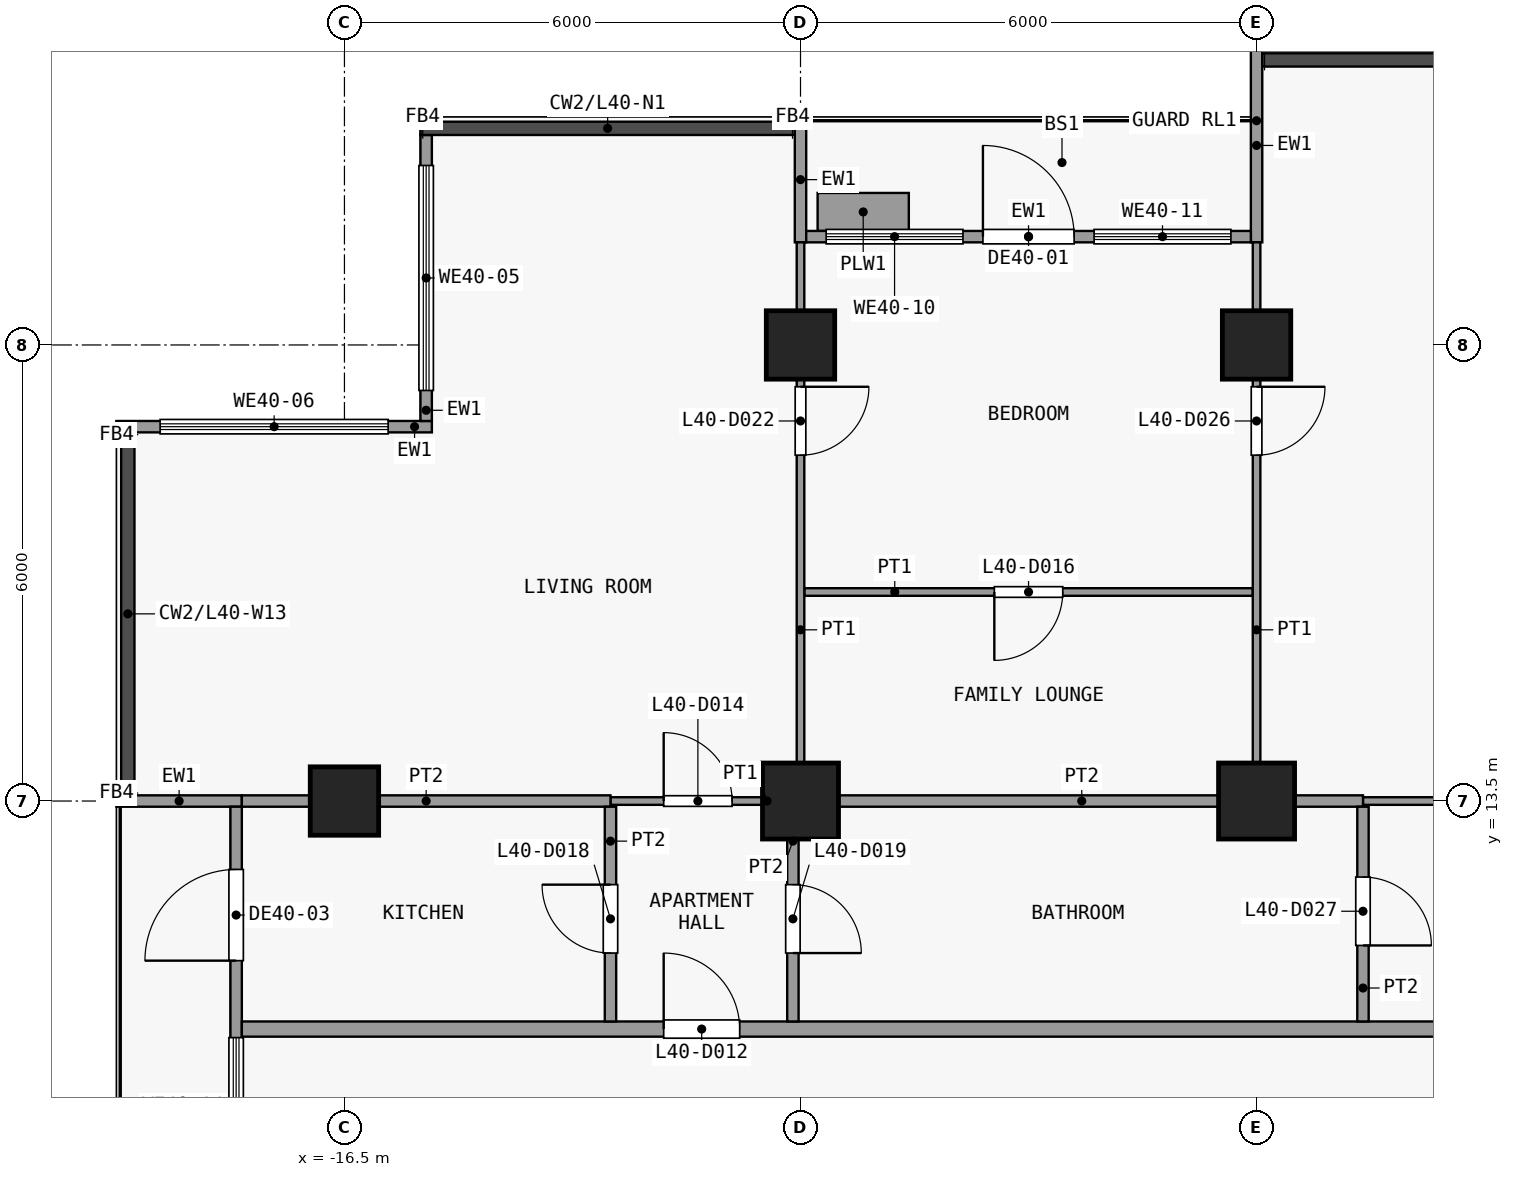
"""IFC4 building model, lengths in metres.
Left out: names, types, materials, properties, quantities, classifications, styles, units other than length and angle.
Written with IfcOpenShell. Run it as: python <this file> out.ifc"""

import sys

from ifc_helpers import new_model, si_unit, direction, frame, frame_2d, origin, origin_2d, place, context, subcontext, project, spatial, rectangle, extrude, element, fill, save


model = new_model("IFC4")
c1 = context("Model", 3, precision=1e-05, world=origin(), true_north=direction((0.0, 1.0)))
c2 = subcontext(c1, "Body", "Model", "MODEL_VIEW")
j1 = project(units=[si_unit("LENGTHUNIT", "METRE"), si_unit("PLANEANGLEUNIT", "RADIAN")], contexts=[c1])
p1 = place(None, origin())
s1 = spatial("IfcSite", under=j1, at=p1, CompositionType="ELEMENT")
p2 = place(p1, origin())
s2 = spatial("IfcBuilding", under=s1, at=p2, CompositionType="ELEMENT")
p3 = place(p2, frame((0.0, 0.0, 163.7)))
s3 = spatial("IfcBuildingStorey", under=s2, at=p3, CompositionType="ELEMENT", Elevation=163.7)
p4 = place(p3, frame((-16.5, 13.5, 0.0), z_axis=(0.0, 0.0, 1.0), x_axis=(1.0, 0.0, 0.0)))
e1 = element("IfcColumn", 1, at=p4, inside=s3, PredefinedType="COLUMN", context=c2, shape_type="SweptSolid", body=[
    extrude(rectangle(XDim=0.9, YDim=0.9, at=origin_2d()), origin(), (0.0, 0.0, 1.0), 3.6),
])
p5 = place(p3, frame((-10.5, 13.5, 0.0), z_axis=(0.0, 0.0, 1.0), x_axis=(1.0, 0.0, 0.0)))
e2 = element("IfcColumn", 2, at=p5, inside=s3, PredefinedType="COLUMN", context=c2, shape_type="SweptSolid", body=[
    extrude(rectangle(XDim=1.0, YDim=1.0, at=origin_2d()), origin(), (0.0, 0.0, 1.0), 3.6),
])
p6 = place(p3, frame((-10.5, 19.5, 0.0), z_axis=(0.0, 0.0, 1.0), x_axis=(1.0, 0.0, 0.0)))
e3 = element("IfcColumn", 3, at=p6, inside=s3, PredefinedType="COLUMN", context=c2, shape_type="SweptSolid", body=[
    extrude(rectangle(XDim=0.9, YDim=0.9, at=origin_2d()), origin(), (0.0, 0.0, 1.0), 3.6),
])
p7 = place(p3, frame((-4.5, 13.5, 0.0), z_axis=(0.0, 0.0, 1.0), x_axis=(1.0, 0.0, 0.0)))
e4 = element("IfcColumn", 4, at=p7, inside=s3, PredefinedType="COLUMN", context=c2, shape_type="SweptSolid", body=[
    extrude(rectangle(XDim=1.0, YDim=1.0, at=origin_2d()), origin(), (0.0, 0.0, 1.0), 3.6),
])
p8 = place(p3, frame((-4.5, 19.5, 0.0), z_axis=(0.0, 0.0, 1.0), x_axis=(1.0, 0.0, 0.0)))
e5 = element("IfcColumn", 5, at=p8, inside=s3, PredefinedType="COLUMN", context=c2, shape_type="SweptSolid", body=[
    extrude(rectangle(XDim=0.9, YDim=0.9, at=origin_2d()), origin(), (0.0, 0.0, 1.0), 3.6),
])
p9 = place(p3, frame((-15.425, 18.5, 0.0), z_axis=(0.0, 0.0, 1.0), x_axis=(0.0, 1.0, 0.0)))
e6 = element("IfcWall", 6, at=p9, inside=s3, PredefinedType="SOLIDWALL", context=c2, shape_type="SweptSolid", body=[
    extrude(rectangle(XDim=3.762, YDim=0.15, at=frame_2d((1.881, 0.0))), origin(), (0.0, 0.0, 1.0), 3.3),
])
p10 = place(p9, frame((0.401, 0.0, 0.9)))
e7 = element("IfcOpeningElement", 7, at=p10, cuts=e6, PredefinedType="OPENING", context=c2, shape_type="SweptSolid", body=[
    extrude(rectangle(XDim=2.96, YDim=2.4, at=frame_2d((1.48, 1.2))), frame((0.0, 0.085, 0.0), z_axis=(0.0, -1.0, 0.0), x_axis=(1.0, 0.0, 0.0)), (0.0, 0.0, 1.0), 0.17),
])
p11 = place(p3, frame((-19.5, 18.425, 0.0), z_axis=(0.0, 0.0, 1.0), x_axis=(1.0, 0.0, 0.0)))
e8 = element("IfcWall", 8, at=p11, inside=s3, PredefinedType="SOLIDWALL", context=c2, shape_type="SweptSolid", body=[
    extrude(rectangle(XDim=4.15, YDim=0.15, at=frame_2d((2.075, 0.0))), origin(), (0.0, 0.0, 1.0), 3.3),
])
p12 = place(p11, frame((0.575, 0.0, 0.9)))
e9 = element("IfcOpeningElement", 9, at=p12, cuts=e8, PredefinedType="OPENING", context=c2, shape_type="SweptSolid", body=[
    extrude(rectangle(XDim=3.0, YDim=2.4, at=frame_2d((1.5, 1.2))), frame((0.0, 0.085, 0.0), z_axis=(0.0, -1.0, 0.0), x_axis=(1.0, 0.0, 0.0)), (0.0, 0.0, 1.0), 0.17),
])
p13 = place(p3, frame((-10.5, 20.85, 0.0), z_axis=(0.0, 0.0, 1.0), x_axis=(0.0, 1.0, 0.0)))
e10 = element("IfcWall", 10, at=p13, inside=s3, PredefinedType="SOLIDWALL", context=c2, shape_type="SweptSolid", body=[
    extrude(rectangle(XDim=1.65, YDim=0.15, at=frame_2d((0.825, 0.0))), origin(), (0.0, 0.0, 1.0), 3.3),
])
p14 = place(p3, frame((-4.5, 20.85, 0.0), z_axis=(0.0, 0.0, 1.0), x_axis=(0.0, 1.0, 0.0)))
e11 = element("IfcWall", 11, at=p14, inside=s3, PredefinedType="SOLIDWALL", context=c2, shape_type="SweptSolid", body=[
    extrude(rectangle(XDim=2.55, YDim=0.15, at=frame_2d((1.275, 0.0))), origin(), (0.0, 0.0, 1.0), 3.3),
])
p15 = place(p3, frame((-10.425, 20.925, 0.0), z_axis=(0.0, 0.0, 1.0), x_axis=(1.0, 0.0, 0.0)))
e12 = element("IfcWall", 12, at=p15, inside=s3, PredefinedType="SOLIDWALL", context=c2, shape_type="SweptSolid", body=[
    extrude(rectangle(XDim=5.85, YDim=0.15, at=frame_2d((2.925, 0.0))), origin(), (0.0, 0.0, 1.0), 3.3),
])
p16 = place(p15, frame((2.325, 0.0, 0.0)))
e13 = element("IfcOpeningElement", 13, at=p16, cuts=e12, PredefinedType="OPENING", context=c2, shape_type="SweptSolid", body=[
    extrude(rectangle(XDim=1.2, YDim=2.4, at=frame_2d((0.6, 1.2))), frame((0.0, 0.085, 0.0), z_axis=(0.0, -1.0, 0.0), x_axis=(1.0, 0.0, 0.0)), (0.0, 0.0, 1.0), 0.17),
])
p17 = place(p15, frame((0.262, 0.0, 0.9)))
e14 = element("IfcOpeningElement", 14, at=p17, cuts=e12, PredefinedType="OPENING", context=c2, shape_type="SweptSolid", body=[
    extrude(rectangle(XDim=1.8, YDim=2.1, at=frame_2d((0.9, 1.05))), frame((0.0, 0.085, 0.0), z_axis=(0.0, -1.0, 0.0), x_axis=(1.0, 0.0, 0.0)), (0.0, 0.0, 1.0), 0.17),
])
p18 = place(p15, frame((3.788, 0.0, 0.9)))
e15 = element("IfcOpeningElement", 15, at=p18, cuts=e12, PredefinedType="OPENING", context=c2, shape_type="SweptSolid", body=[
    extrude(rectangle(XDim=1.8, YDim=2.1, at=frame_2d((0.9, 1.05))), frame((0.0, 0.085, 0.0), z_axis=(0.0, -1.0, 0.0), x_axis=(1.0, 0.0, 0.0)), (0.0, 0.0, 1.0), 0.17),
])
p19 = place(p3, frame((-10.275, 21.25, 0.0), z_axis=(0.0, 0.0, 1.0), x_axis=(1.0, 0.0, 0.0)))
e16 = element("IfcWall", 16, at=p19, inside=s3, PredefinedType="USERDEFINED", context=c2, shape_type="SweptSolid", body=[
    extrude(rectangle(XDim=1.2, YDim=0.5, at=frame_2d((0.6, 0.0))), origin(), (0.0, 0.0, 1.0), 0.9),
])
p20 = place(p3, frame((-17.85, 13.5, 0.0), z_axis=(0.0, 0.0, 1.0), x_axis=(-1.0, 0.0, 0.0)))
e17 = element("IfcWall", 17, at=p20, inside=s3, PredefinedType="SOLIDWALL", context=c2, shape_type="SweptSolid", body=[
    extrude(rectangle(XDim=1.65, YDim=0.15, at=frame_2d((0.825, 0.0))), origin(), (0.0, 0.0, 1.0), 3.3),
])
p21 = place(p3, frame((-17.925, 7.575, 0.0), z_axis=(0.0, 0.0, 1.0), x_axis=(0.0, 1.0, 0.0)))
e18 = element("IfcWall", 18, at=p21, inside=s3, PredefinedType="SOLIDWALL", context=c2, shape_type="SweptSolid", body=[
    extrude(rectangle(XDim=5.85, YDim=0.15, at=frame_2d((2.925, 0.0))), origin(), (0.0, 0.0, 1.0), 3.3),
])
p22 = place(p21, frame((3.825, 0.0, 0.0)))
e19 = element("IfcOpeningElement", 19, at=p22, cuts=e18, PredefinedType="OPENING", context=c2, shape_type="SweptSolid", body=[
    extrude(rectangle(XDim=1.2, YDim=2.4, at=frame_2d((0.6, 1.2))), frame((0.0, 0.085, 0.0), z_axis=(0.0, -1.0, 0.0), x_axis=(1.0, 0.0, 0.0)), (0.0, 0.0, 1.0), 0.17),
])
p23 = place(p21, frame((1.012, 0.0, 0.9)))
e20 = element("IfcOpeningElement", 20, at=p23, cuts=e18, PredefinedType="OPENING", context=c2, shape_type="SweptSolid", body=[
    extrude(rectangle(XDim=1.8, YDim=2.1, at=frame_2d((0.9, 1.05))), frame((0.0, 0.085, 0.0), z_axis=(0.0, -1.0, 0.0), x_axis=(1.0, 0.0, 0.0)), (0.0, 0.0, 1.0), 0.17),
])
p24 = place(p3, frame((-17.85, 10.5, 0.0), z_axis=(0.0, 0.0, 1.0), x_axis=(1.0, 0.0, 0.0)))
e21 = element("IfcWall", 21, at=p24, inside=s3, PredefinedType="PARTITIONING", context=c2, shape_type="SweptSolid", body=[
    extrude(rectangle(XDim=37.2, YDim=0.2, at=frame_2d((18.6, 0.0))), origin(), (0.0, 0.0, 1.0), 3.3),
])
p25 = place(p24, frame((5.55, 0.0, 0.0)))
e22 = element("IfcOpeningElement", 22, at=p25, cuts=e21, PredefinedType="OPENING", context=c2, shape_type="SweptSolid", body=[
    extrude(rectangle(XDim=1.0, YDim=2.1, at=frame_2d((0.5, 1.05))), frame((0.0, 0.11, 0.0), z_axis=(0.0, -1.0, 0.0), x_axis=(1.0, 0.0, 0.0)), (0.0, 0.0, 1.0), 0.22),
])
p26 = place(p24, frame((25.55, 0.0, 0.0)))
e23 = element("IfcOpeningElement", 23, at=p26, cuts=e21, PredefinedType="OPENING", context=c2, shape_type="SweptSolid", body=[
    extrude(rectangle(XDim=1.0, YDim=2.1, at=frame_2d((0.5, 1.05))), frame((0.0, 0.11, 0.0), z_axis=(0.0, -1.0, 0.0), x_axis=(1.0, 0.0, 0.0)), (0.0, 0.0, 1.0), 0.22),
])
p27 = place(p3, frame((-13.0, 13.5, 0.0), z_axis=(0.0, 0.0, 1.0), x_axis=(1.0, 0.0, 0.0)))
e24 = element("IfcWall", 24, at=p27, inside=s3, PredefinedType="PARTITIONING", context=c2, shape_type="SweptSolid", body=[
    extrude(rectangle(XDim=2.4, YDim=0.1, at=frame_2d((1.2, 0.0))), origin(), (0.0, 0.0, 1.0), 3.3),
])
p28 = place(p27, frame((0.7, 0.0, 0.0)))
e25 = element("IfcOpeningElement", 25, at=p28, cuts=e24, PredefinedType="OPENING", context=c2, shape_type="SweptSolid", body=[
    extrude(rectangle(XDim=0.9, YDim=2.1, at=frame_2d((0.45, 1.05))), frame((0.0, 0.06, 0.0), z_axis=(0.0, -1.0, 0.0), x_axis=(1.0, 0.0, 0.0)), (0.0, 0.0, 1.0), 0.12),
])
p29 = place(p3, frame((-3.1, 13.5, 0.0), z_axis=(0.0, 0.0, 1.0), x_axis=(1.0, 0.0, 0.0)))
e26 = element("IfcWall", 26, at=p29, inside=s3, PredefinedType="PARTITIONING", context=c2, shape_type="SweptSolid", body=[
    extrude(rectangle(XDim=7.6, YDim=0.1, at=frame_2d((3.8, 0.0))), origin(), (0.0, 0.0, 1.0), 3.3),
])
p30 = place(p3, frame((-17.85, 13.5, 0.0), z_axis=(0.0, 0.0, 1.0), x_axis=(1.0, 0.0, 0.0)))
e27 = element("IfcWall", 27, at=p30, inside=s3, PredefinedType="PARTITIONING", context=c2, shape_type="SweptSolid", body=[
    extrude(rectangle(XDim=4.85, YDim=0.15, at=frame_2d((2.425, 0.0))), origin(), (0.0, 0.0, 1.0), 3.3),
])
p31 = place(p3, frame((-10.5, 13.5, 0.0), z_axis=(0.0, 0.0, 1.0), x_axis=(1.0, 0.0, 0.0)))
e28 = element("IfcWall", 28, at=p31, inside=s3, PredefinedType="PARTITIONING", context=c2, shape_type="SweptSolid", body=[
    extrude(rectangle(XDim=7.4, YDim=0.15, at=frame_2d((3.7, 0.0))), origin(), (0.0, 0.0, 1.0), 3.3),
])
p32 = place(p3, frame((-10.45, 16.25, 0.0), z_axis=(0.0, 0.0, 1.0), x_axis=(1.0, 0.0, 0.0)))
e29 = element("IfcWall", 29, at=p32, inside=s3, PredefinedType="PARTITIONING", context=c2, shape_type="SweptSolid", body=[
    extrude(rectangle(XDim=5.9, YDim=0.1, at=frame_2d((2.95, 0.0))), origin(), (0.0, 0.0, 1.0), 3.3),
])
p33 = place(p32, frame((2.5, 0.0, 0.0)))
e30 = element("IfcOpeningElement", 30, at=p33, cuts=e29, PredefinedType="OPENING", context=c2, shape_type="SweptSolid", body=[
    extrude(rectangle(XDim=0.9, YDim=2.1, at=frame_2d((0.45, 1.05))), frame((0.0, 0.06, 0.0), z_axis=(0.0, -1.0, 0.0), x_axis=(1.0, 0.0, 0.0)), (0.0, 0.0, 1.0), 0.12),
])
p34 = place(p3, frame((-13.0, 10.6, 0.0), z_axis=(0.0, 0.0, 1.0), x_axis=(0.0, 1.0, 0.0)))
e31 = element("IfcWall", 31, at=p34, inside=s3, PredefinedType="PARTITIONING", context=c2, shape_type="SweptSolid", body=[
    extrude(rectangle(XDim=2.825, YDim=0.15, at=frame_2d((1.413, 0.0))), origin(), (0.0, 0.0, 1.0), 3.3),
])
p35 = place(p34, frame((0.9, 0.0, 0.0)))
e32 = element("IfcOpeningElement", 32, at=p35, cuts=e31, PredefinedType="OPENING", context=c2, shape_type="SweptSolid", body=[
    extrude(rectangle(XDim=0.9, YDim=2.1, at=frame_2d((0.45, 1.05))), frame((0.0, 0.085, 0.0), z_axis=(0.0, -1.0, 0.0), x_axis=(1.0, 0.0, 0.0)), (0.0, 0.0, 1.0), 0.17),
])
p36 = place(p3, frame((-10.6, 10.6, 0.0), z_axis=(0.0, 0.0, 1.0), x_axis=(0.0, 1.0, 0.0)))
e33 = element("IfcWall", 33, at=p36, inside=s3, PredefinedType="PARTITIONING", context=c2, shape_type="SweptSolid", body=[
    extrude(rectangle(XDim=2.825, YDim=0.15, at=frame_2d((1.413, 0.0))), origin(), (0.0, 0.0, 1.0), 3.3),
])
p37 = place(p36, frame((0.9, 0.0, 0.0)))
e34 = element("IfcOpeningElement", 34, at=p37, cuts=e33, PredefinedType="OPENING", context=c2, shape_type="SweptSolid", body=[
    extrude(rectangle(XDim=0.9, YDim=2.1, at=frame_2d((0.45, 1.05))), frame((0.0, 0.085, 0.0), z_axis=(0.0, -1.0, 0.0), x_axis=(1.0, 0.0, 0.0)), (0.0, 0.0, 1.0), 0.17),
])
p38 = place(p3, frame((-10.5, 13.575, 0.0), z_axis=(0.0, 0.0, 1.0), x_axis=(0.0, 1.0, 0.0)))
e35 = element("IfcWall", 35, at=p38, inside=s3, PredefinedType="PARTITIONING", context=c2, shape_type="SweptSolid", body=[
    extrude(rectangle(XDim=7.275, YDim=0.1, at=frame_2d((3.638, 0.0))), origin(), (0.0, 0.0, 1.0), 3.3),
])
p39 = place(p38, frame((4.475, 0.0, 0.0)))
e36 = element("IfcOpeningElement", 36, at=p39, cuts=e35, PredefinedType="OPENING", context=c2, shape_type="SweptSolid", body=[
    extrude(rectangle(XDim=0.9, YDim=2.1, at=frame_2d((0.45, 1.05))), frame((0.0, 0.06, 0.0), z_axis=(0.0, -1.0, 0.0), x_axis=(1.0, 0.0, 0.0)), (0.0, 0.0, 1.0), 0.12),
])
p40 = place(p3, frame((-4.5, 13.575, 0.0), z_axis=(0.0, 0.0, 1.0), x_axis=(0.0, 1.0, 0.0)))
e37 = element("IfcWall", 37, at=p40, inside=s3, PredefinedType="PARTITIONING", context=c2, shape_type="SweptSolid", body=[
    extrude(rectangle(XDim=7.275, YDim=0.1, at=frame_2d((3.638, 0.0))), origin(), (0.0, 0.0, 1.0), 3.3),
])
p41 = place(p40, frame((4.475, 0.0, 0.0)))
e38 = element("IfcOpeningElement", 38, at=p41, cuts=e37, PredefinedType="OPENING", context=c2, shape_type="SweptSolid", body=[
    extrude(rectangle(XDim=0.9, YDim=2.1, at=frame_2d((0.45, 1.05))), frame((0.0, 0.06, 0.0), z_axis=(0.0, -1.0, 0.0), x_axis=(1.0, 0.0, 0.0)), (0.0, 0.0, 1.0), 0.12),
])
p42 = place(p3, frame((-3.1, 10.6, 0.0), z_axis=(0.0, 0.0, 1.0), x_axis=(0.0, 1.0, 0.0)))
e39 = element("IfcWall", 39, at=p42, inside=s3, PredefinedType="PARTITIONING", context=c2, shape_type="SweptSolid", body=[
    extrude(rectangle(XDim=2.825, YDim=0.15, at=frame_2d((1.413, 0.0))), origin(), (0.0, 0.0, 1.0), 3.3),
])
p43 = place(p42, frame((1.0, 0.0, 0.0)))
e40 = element("IfcOpeningElement", 40, at=p43, cuts=e39, PredefinedType="OPENING", context=c2, shape_type="SweptSolid", body=[
    extrude(rectangle(XDim=0.9, YDim=2.1, at=frame_2d((0.45, 1.05))), frame((0.0, 0.085, 0.0), z_axis=(0.0, -1.0, 0.0), x_axis=(1.0, 0.0, 0.0)), (0.0, 0.0, 1.0), 0.17),
])
p44 = place(p10, origin())
e41 = element("IfcWindow", 41, at=p44, inside=s3, PartitioningType="SINGLE_PANEL", PredefinedType="WINDOW", context=c2, shape_type="SweptSolid", body=[
    extrude(rectangle(XDim=2.96, YDim=2.4, at=frame_2d((1.48, 1.2))), frame((0.0, 0.03, 0.0), z_axis=(0.0, -1.0, 0.0), x_axis=(1.0, 0.0, 0.0)), (0.0, 0.0, 1.0), 0.06),
])
fill(e7, e41)
p45 = place(p12, origin())
e42 = element("IfcWindow", 42, at=p45, inside=s3, PartitioningType="SINGLE_PANEL", PredefinedType="WINDOW", context=c2, shape_type="SweptSolid", body=[
    extrude(rectangle(XDim=3.0, YDim=2.4, at=frame_2d((1.5, 1.2))), frame((0.0, 0.03, 0.0), z_axis=(0.0, -1.0, 0.0), x_axis=(1.0, 0.0, 0.0)), (0.0, 0.0, 1.0), 0.06),
])
fill(e9, e42)
p46 = place(p16, origin())
e43 = element("IfcDoor", 43, at=p46, inside=s3, OperationType="SINGLE_SWING_LEFT", PredefinedType="DOOR", context=c2, shape_type="SweptSolid", body=[
    extrude(rectangle(XDim=1.2, YDim=2.4, at=frame_2d((0.6, 1.2))), frame((0.0, 0.025, 0.0), z_axis=(0.0, -1.0, 0.0), x_axis=(1.0, 0.0, 0.0)), (0.0, 0.0, 1.0), 0.05),
])
fill(e13, e43)
p47 = place(p17, origin())
e44 = element("IfcWindow", 44, at=p47, inside=s3, PartitioningType="SINGLE_PANEL", PredefinedType="WINDOW", context=c2, shape_type="SweptSolid", body=[
    extrude(rectangle(XDim=1.8, YDim=2.1, at=frame_2d((0.9, 1.05))), frame((0.0, 0.03, 0.0), z_axis=(0.0, -1.0, 0.0), x_axis=(1.0, 0.0, 0.0)), (0.0, 0.0, 1.0), 0.06),
])
fill(e14, e44)
p48 = place(p18, origin())
e45 = element("IfcWindow", 45, at=p48, inside=s3, PartitioningType="SINGLE_PANEL", PredefinedType="WINDOW", context=c2, shape_type="SweptSolid", body=[
    extrude(rectangle(XDim=1.8, YDim=2.1, at=frame_2d((0.9, 1.05))), frame((0.0, 0.03, 0.0), z_axis=(0.0, -1.0, 0.0), x_axis=(1.0, 0.0, 0.0)), (0.0, 0.0, 1.0), 0.06),
])
fill(e15, e45)
p49 = place(p22, origin())
e46 = element("IfcDoor", 46, at=p49, inside=s3, OperationType="SINGLE_SWING_LEFT", PredefinedType="DOOR", context=c2, shape_type="SweptSolid", body=[
    extrude(rectangle(XDim=1.2, YDim=2.4, at=frame_2d((0.6, 1.2))), frame((0.0, 0.025, 0.0), z_axis=(0.0, -1.0, 0.0), x_axis=(1.0, 0.0, 0.0)), (0.0, 0.0, 1.0), 0.05),
])
fill(e19, e46)
p50 = place(p23, origin())
e47 = element("IfcWindow", 47, at=p50, inside=s3, PartitioningType="SINGLE_PANEL", PredefinedType="WINDOW", context=c2, shape_type="SweptSolid", body=[
    extrude(rectangle(XDim=1.8, YDim=2.1, at=frame_2d((0.9, 1.05))), frame((0.0, 0.03, 0.0), z_axis=(0.0, -1.0, 0.0), x_axis=(1.0, 0.0, 0.0)), (0.0, 0.0, 1.0), 0.06),
])
fill(e20, e47)
p51 = place(p25, origin())
e48 = element("IfcDoor", 48, at=p51, inside=s3, OperationType="SINGLE_SWING_RIGHT", PredefinedType="DOOR", context=c2, shape_type="SweptSolid", body=[
    extrude(rectangle(XDim=1.0, YDim=2.1, at=frame_2d((0.5, 1.05))), frame((0.0, 0.025, 0.0), z_axis=(0.0, -1.0, 0.0), x_axis=(1.0, 0.0, 0.0)), (0.0, 0.0, 1.0), 0.05),
])
fill(e22, e48)
p52 = place(p28, origin())
e49 = element("IfcDoor", 49, at=p52, inside=s3, OperationType="SINGLE_SWING_RIGHT", PredefinedType="DOOR", context=c2, shape_type="SweptSolid", body=[
    extrude(rectangle(XDim=0.9, YDim=2.1, at=frame_2d((0.45, 1.05))), frame((0.0, 0.025, 0.0), z_axis=(0.0, -1.0, 0.0), x_axis=(1.0, 0.0, 0.0)), (0.0, 0.0, 1.0), 0.05),
])
fill(e25, e49)
p53 = place(p33, origin())
e50 = element("IfcDoor", 50, at=p53, inside=s3, OperationType="SINGLE_SWING_LEFT", PredefinedType="DOOR", context=c2, shape_type="SweptSolid", body=[
    extrude(rectangle(XDim=0.9, YDim=2.1, at=frame_2d((0.45, 1.05))), frame((0.0, 0.025, 0.0), z_axis=(0.0, -1.0, 0.0), x_axis=(1.0, 0.0, 0.0)), (0.0, 0.0, 1.0), 0.05),
])
fill(e30, e50)
p54 = place(p35, origin())
e51 = element("IfcDoor", 51, at=p54, inside=s3, OperationType="SINGLE_SWING_LEFT", PredefinedType="DOOR", context=c2, shape_type="SweptSolid", body=[
    extrude(rectangle(XDim=0.9, YDim=2.1, at=frame_2d((0.45, 1.05))), frame((0.0, 0.025, 0.0), z_axis=(0.0, -1.0, 0.0), x_axis=(1.0, 0.0, 0.0)), (0.0, 0.0, 1.0), 0.05),
])
fill(e32, e51)
p55 = place(p37, origin())
e52 = element("IfcDoor", 52, at=p55, inside=s3, OperationType="SINGLE_SWING_LEFT", PredefinedType="DOOR", context=c2, shape_type="SweptSolid", body=[
    extrude(rectangle(XDim=0.9, YDim=2.1, at=frame_2d((0.45, 1.05))), frame((0.0, 0.025, 0.0), z_axis=(0.0, -1.0, 0.0), x_axis=(1.0, 0.0, 0.0)), (0.0, 0.0, 1.0), 0.05),
])
fill(e34, e52)
p56 = place(p39, origin())
e53 = element("IfcDoor", 53, at=p56, inside=s3, OperationType="SINGLE_SWING_RIGHT", PredefinedType="DOOR", context=c2, shape_type="SweptSolid", body=[
    extrude(rectangle(XDim=0.9, YDim=2.1, at=frame_2d((0.45, 1.05))), frame((0.0, 0.025, 0.0), z_axis=(0.0, -1.0, 0.0), x_axis=(1.0, 0.0, 0.0)), (0.0, 0.0, 1.0), 0.05),
])
fill(e36, e53)
p57 = place(p41, origin())
e54 = element("IfcDoor", 54, at=p57, inside=s3, OperationType="SINGLE_SWING_RIGHT", PredefinedType="DOOR", context=c2, shape_type="SweptSolid", body=[
    extrude(rectangle(XDim=0.9, YDim=2.1, at=frame_2d((0.45, 1.05))), frame((0.0, 0.025, 0.0), z_axis=(0.0, -1.0, 0.0), x_axis=(1.0, 0.0, 0.0)), (0.0, 0.0, 1.0), 0.05),
])
fill(e38, e54)
p58 = place(p43, origin())
e55 = element("IfcDoor", 55, at=p58, inside=s3, OperationType="SINGLE_SWING_LEFT", PredefinedType="DOOR", context=c2, shape_type="SweptSolid", body=[
    extrude(rectangle(XDim=0.9, YDim=2.1, at=frame_2d((0.45, 1.05))), frame((0.0, 0.025, 0.0), z_axis=(0.0, -1.0, 0.0), x_axis=(1.0, 0.0, 0.0)), (0.0, 0.0, 1.0), 0.05),
])
fill(e40, e55)
save(model, sys.argv[1])
